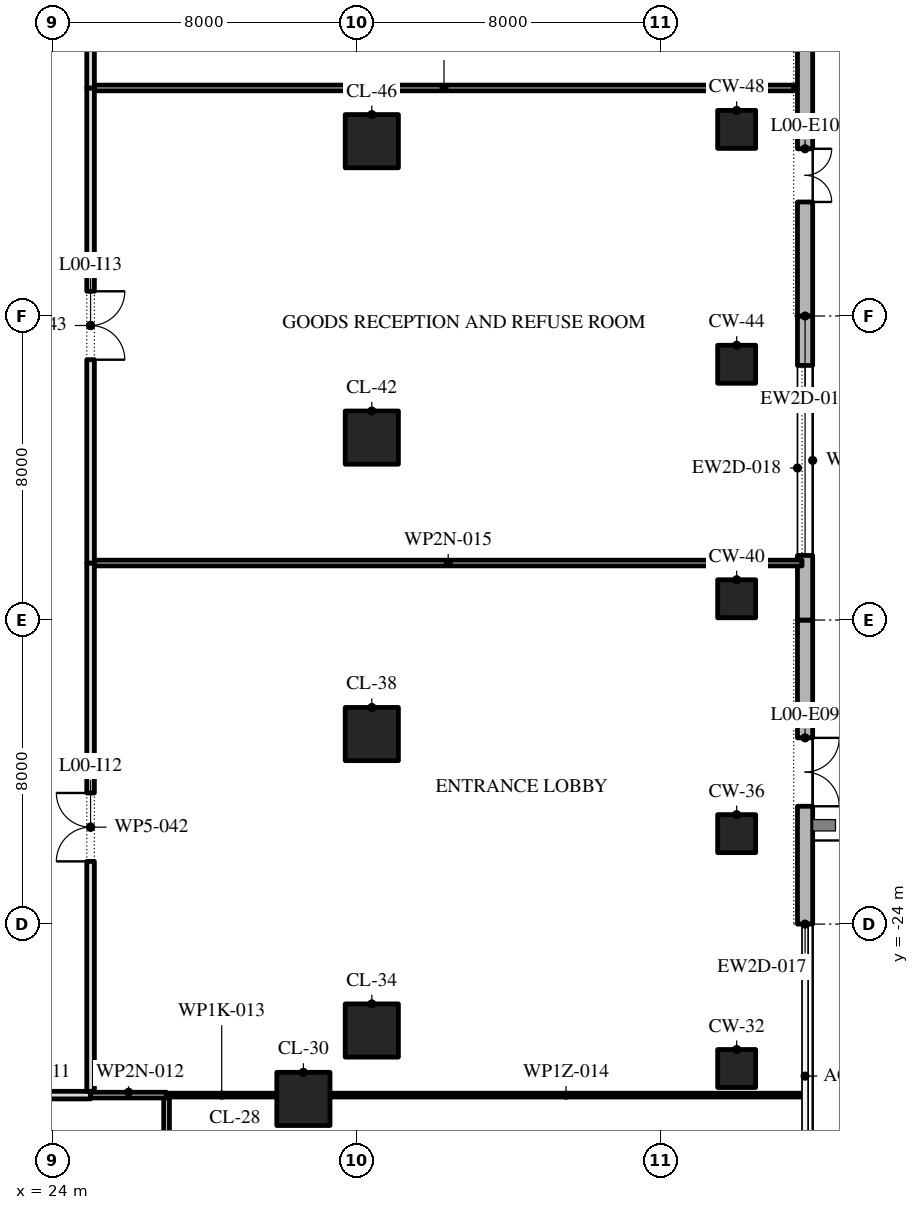
"""IFC4 building model, lengths in metres.
Left out: names, types, materials, properties, quantities, classifications, styles, units other than length and angle.
Written with IfcOpenShell. Run it as: python <this file> out.ifc"""

import sys

from ifc_helpers import new_model, si_unit, direction, frame, frame_2d, origin, origin_2d, place, context, subcontext, project, spatial, polyline, rectangle, outline, extrude, element, fill, save


model = new_model("IFC4")
c1 = context("Model", 3, precision=1e-05, world=origin(), true_north=direction((0.0, 1.0)))
c2 = subcontext(c1, "Body", "Model", "MODEL_VIEW")
j1 = project(units=[si_unit("LENGTHUNIT", "METRE"), si_unit("PLANEANGLEUNIT", "RADIAN")], contexts=[c1])
p1 = place(None, origin())
s1 = spatial("IfcSite", under=j1, at=p1, CompositionType="ELEMENT")
p2 = place(p1, origin())
s2 = spatial("IfcBuilding", under=s1, at=p2, CompositionType="ELEMENT")
p3 = place(p2, origin())
s3 = spatial("IfcBuildingStorey", under=s2, at=p3, CompositionType="ELEMENT", Elevation=0.0)
p4 = place(p3, frame((30.6, -28.6, 0.0), z_axis=(0.0, 0.0, 1.0), x_axis=(1.0, 0.0, 0.0)))
e1 = element("IfcColumn", 1, at=p4, inside=s3, PredefinedType="COLUMN", context=c2, shape_type="SweptSolid", body=[
    extrude(rectangle(XDim=1.4, YDim=1.4, at=origin_2d()), origin(), (0.0, 0.0, 1.0), 8.0),
])
p5 = place(p3, frame((42.0, -27.8, 0.0), z_axis=(0.0, 0.0, 1.0), x_axis=(1.0, 0.0, 0.0)))
e2 = element("IfcColumn", 2, at=p5, inside=s3, PredefinedType="COLUMN", context=c2, shape_type="SweptSolid", body=[
    extrude(rectangle(XDim=1.0, YDim=1.0, at=origin_2d()), origin(), (0.0, 0.0, 1.0), 8.0),
])
p6 = place(p3, frame((32.4, -26.8, 0.0), z_axis=(0.0, 0.0, 1.0), x_axis=(1.0, 0.0, 0.0)))
e3 = element("IfcColumn", 3, at=p6, inside=s3, PredefinedType="COLUMN", context=c2, shape_type="SweptSolid", body=[
    extrude(rectangle(XDim=1.4, YDim=1.4, at=origin_2d()), origin(), (0.0, 0.0, 1.0), 8.0),
])
p7 = place(p3, frame((42.0, -21.62, 0.0), z_axis=(0.0, 0.0, 1.0), x_axis=(1.0, 0.0, 0.0)))
e4 = element("IfcColumn", 4, at=p7, inside=s3, PredefinedType="COLUMN", context=c2, shape_type="SweptSolid", body=[
    extrude(rectangle(XDim=1.0, YDim=1.0, at=origin_2d()), origin(), (0.0, 0.0, 1.0), 8.0),
])
p8 = place(p3, frame((32.4, -19.0, 0.0), z_axis=(0.0, 0.0, 1.0), x_axis=(1.0, 0.0, 0.0)))
e5 = element("IfcColumn", 5, at=p8, inside=s3, PredefinedType="COLUMN", context=c2, shape_type="SweptSolid", body=[
    extrude(rectangle(XDim=1.4, YDim=1.4, at=origin_2d()), origin(), (0.0, 0.0, 1.0), 8.0),
])
p9 = place(p3, frame((42.0, -15.44, 0.0), z_axis=(0.0, 0.0, 1.0), x_axis=(1.0, 0.0, 0.0)))
e6 = element("IfcColumn", 6, at=p9, inside=s3, PredefinedType="COLUMN", context=c2, shape_type="SweptSolid", body=[
    extrude(rectangle(XDim=1.0, YDim=1.0, at=origin_2d()), origin(), (0.0, 0.0, 1.0), 8.0),
])
p10 = place(p3, frame((32.4, -11.2, 0.0), z_axis=(0.0, 0.0, 1.0), x_axis=(1.0, 0.0, 0.0)))
e7 = element("IfcColumn", 7, at=p10, inside=s3, PredefinedType="COLUMN", context=c2, shape_type="SweptSolid", body=[
    extrude(rectangle(XDim=1.4, YDim=1.4, at=origin_2d()), origin(), (0.0, 0.0, 1.0), 8.0),
])
p11 = place(p3, frame((42.0, -9.27, 0.0), z_axis=(0.0, 0.0, 1.0), x_axis=(1.0, 0.0, 0.0)))
e8 = element("IfcColumn", 8, at=p11, inside=s3, PredefinedType="COLUMN", context=c2, shape_type="SweptSolid", body=[
    extrude(rectangle(XDim=1.0, YDim=1.0, at=origin_2d()), origin(), (0.0, 0.0, 1.0), 8.0),
])
p12 = place(p3, frame((32.4, -3.4, 0.0), z_axis=(0.0, 0.0, 1.0), x_axis=(1.0, 0.0, 0.0)))
e9 = element("IfcColumn", 9, at=p12, inside=s3, PredefinedType="COLUMN", context=c2, shape_type="SweptSolid", body=[
    extrude(rectangle(XDim=1.4, YDim=1.4, at=origin_2d()), origin(), (0.0, 0.0, 1.0), 8.0),
])
p13 = place(p3, frame((42.0, -3.09, 0.0), z_axis=(0.0, 0.0, 1.0), x_axis=(1.0, 0.0, 0.0)))
e10 = element("IfcColumn", 10, at=p13, inside=s3, PredefinedType="COLUMN", context=c2, shape_type="SweptSolid", body=[
    extrude(rectangle(XDim=1.0, YDim=1.0, at=origin_2d()), origin(), (0.0, 0.0, 1.0), 8.0),
])
p14 = place(p3, frame((43.8, -24.0, 0.0), z_axis=(0.0, 0.0, 1.0), x_axis=(0.0, 1.0, 0.0)))
e11 = element("IfcWall", 11, at=p14, inside=s3, PredefinedType="STANDARD", context=c2, shape_type="SweptSolid", body=[
    extrude(rectangle(XDim=8.0, YDim=0.4, at=frame_2d((4.0, 0.0))), origin(), (0.0, 0.0, 1.0), 7.7),
])
p15 = place(p14, frame((3.1, 0.0, 0.0)))
e12 = element("IfcOpeningElement", 12, at=p15, cuts=e11, PredefinedType="OPENING", context=c2, shape_type="SweptSolid", body=[
    extrude(rectangle(XDim=1.8, YDim=2.7, at=frame_2d((0.9, 1.35))), frame((0.0, 0.21, 0.0), z_axis=(0.0, -1.0, 0.0), x_axis=(1.0, 0.0, 0.0)), (0.0, 0.0, 1.0), 0.42),
])
p16 = place(p3, frame((43.8, -16.0, 0.0), z_axis=(0.0, 0.0, 1.0), x_axis=(0.0, 1.0, 0.0)))
e13 = element("IfcWall", 13, at=p16, inside=s3, PredefinedType="STANDARD", context=c2, shape_type="SweptSolid", body=[
    extrude(rectangle(XDim=8.0, YDim=0.4, at=frame_2d((4.0, 0.0))), origin(), (0.0, 0.0, 1.0), 7.7),
])
p17 = place(p16, frame((1.7, 0.0, 0.5)))
e14 = element("IfcOpeningElement", 14, at=p17, cuts=e13, PredefinedType="OPENING", context=c2, shape_type="SweptSolid", body=[
    extrude(outline(polyline([(0.0, 0.0), (5.0, 0.0), (5.0, 3.35), (4.955, 3.907), (4.822, 4.451), (4.604, 4.966), (4.306, 5.44), (3.937, 5.86), (3.505, 6.216), (3.022, 6.498), (2.5, 6.7), (1.978, 6.498), (1.495, 6.216), (1.063, 5.86), (0.694, 5.44), (0.396, 4.966), (0.178, 4.451), (0.045, 3.907), (0.0, 3.35), (0.0, 0.0)])), frame((0.0, 0.21, 0.0), z_axis=(0.0, -1.0, 0.0), x_axis=(1.0, 0.0, 0.0)), (0.0, 0.0, 1.0), 0.42),
])
p18 = place(p3, frame((43.8, -8.0, 0.0), z_axis=(0.0, 0.0, 1.0), x_axis=(0.0, 1.0, 0.0)))
e15 = element("IfcWall", 15, at=p18, inside=s3, PredefinedType="STANDARD", context=c2, shape_type="SweptSolid", body=[
    extrude(rectangle(XDim=8.0, YDim=0.4, at=frame_2d((4.0, 0.0))), origin(), (0.0, 0.0, 1.0), 7.7),
])
p19 = place(p18, frame((3.0, 0.0, 0.0)))
e16 = element("IfcOpeningElement", 16, at=p19, cuts=e15, PredefinedType="OPENING", context=c2, shape_type="SweptSolid", body=[
    extrude(rectangle(XDim=1.4, YDim=2.7, at=frame_2d((0.7, 1.35))), frame((0.0, 0.21, 0.0), z_axis=(0.0, -1.0, 0.0), x_axis=(1.0, 0.0, 0.0)), (0.0, 0.0, 1.0), 0.42),
])
p20 = place(p3, frame((22.0, -28.5, 0.0), z_axis=(0.0, 0.0, 1.0), x_axis=(1.0, 0.0, 0.0)))
e17 = element("IfcWall", 17, at=p20, inside=s3, PredefinedType="PARTITIONING", context=c2, shape_type="SweptSolid", body=[
    extrude(rectangle(XDim=3.0, YDim=0.2, at=frame_2d((1.5, 0.0))), origin(), (0.0, 0.0, 1.0), 7.7),
])
p21 = place(p3, frame((25.0, -28.5, 0.0), z_axis=(0.0, 0.0, 1.0), x_axis=(1.0, 0.0, 0.0)))
e18 = element("IfcWall", 18, at=p21, inside=s3, PredefinedType="PARTITIONING", context=c2, shape_type="SweptSolid", body=[
    extrude(rectangle(XDim=2.0, YDim=0.15, at=frame_2d((1.0, 0.0))), origin(), (0.0, 0.0, 1.0), 7.7),
])
p22 = place(p3, frame((27.0, -28.5, 0.0), z_axis=(0.0, 0.0, 1.0), x_axis=(1.0, 0.0, 0.0)))
e19 = element("IfcWall", 19, at=p22, inside=s3, PredefinedType="PARTITIONING", context=c2, shape_type="SweptSolid", body=[
    extrude(rectangle(XDim=2.9, YDim=0.1, at=frame_2d((1.45, 0.0))), origin(), (0.0, 0.0, 1.0), 7.7),
])
p23 = place(p3, frame((31.3, -28.5, 0.0), z_axis=(0.0, 0.0, 1.0), x_axis=(1.0, 0.0, 0.0)))
e20 = element("IfcWall", 20, at=p23, inside=s3, PredefinedType="PARTITIONING", context=c2, shape_type="SweptSolid", body=[
    extrude(rectangle(XDim=12.42, YDim=0.1, at=frame_2d((6.21, 0.0))), origin(), (0.0, 0.0, 1.0), 7.164),
])
p24 = place(p3, frame((25.1, -14.5, 0.0), z_axis=(0.0, 0.0, 1.0), x_axis=(1.0, 0.0, 0.0)))
e21 = element("IfcWall", 21, at=p24, inside=s3, PredefinedType="PARTITIONING", context=c2, shape_type="SweptSolid", body=[
    extrude(rectangle(XDim=18.62, YDim=0.15, at=frame_2d((9.31, 0.0))), origin(), (0.0, 0.0, 1.0), 7.7),
])
p25 = place(p3, frame((25.1, -2.0, 0.0), z_axis=(0.0, 0.0, 1.0), x_axis=(1.0, 0.0, 0.0)))
e22 = element("IfcWall", 22, at=p25, inside=s3, PredefinedType="PARTITIONING", context=c2, shape_type="SweptSolid", body=[
    extrude(rectangle(XDim=18.4, YDim=0.15, at=frame_2d((9.2, 0.0))), origin(), (0.0, 0.0, 1.0), 7.7),
])
p26 = place(p3, frame((25.0, -28.4, 0.0), z_axis=(0.0, 0.0, 1.0), x_axis=(0.0, 1.0, 0.0)))
e23 = element("IfcWall", 23, at=p26, inside=s3, PredefinedType="PARTITIONING", context=c2, shape_type="SweptSolid", body=[
    extrude(rectangle(XDim=13.9, YDim=0.2, at=frame_2d((6.95, 0.0))), origin(), (0.0, 0.0, 1.0), 7.7),
])
p27 = place(p26, frame((6.05, 0.0, 0.0)))
e24 = element("IfcOpeningElement", 24, at=p27, cuts=e23, PredefinedType="OPENING", context=c2, shape_type="SweptSolid", body=[
    extrude(rectangle(XDim=1.8, YDim=2.1, at=frame_2d((0.9, 1.05))), frame((0.0, 0.11, 0.0), z_axis=(0.0, -1.0, 0.0), x_axis=(1.0, 0.0, 0.0)), (0.0, 0.0, 1.0), 0.22),
])
p28 = place(p3, frame((25.0, -14.5, 0.0), z_axis=(0.0, 0.0, 1.0), x_axis=(0.0, 1.0, 0.0)))
e25 = element("IfcWall", 25, at=p28, inside=s3, PredefinedType="PARTITIONING", context=c2, shape_type="SweptSolid", body=[
    extrude(rectangle(XDim=12.5, YDim=0.2, at=frame_2d((6.25, 0.0))), origin(), (0.0, 0.0, 1.0), 7.7),
])
p29 = place(p28, frame((5.35, 0.0, 0.0)))
e26 = element("IfcOpeningElement", 26, at=p29, cuts=e25, PredefinedType="OPENING", context=c2, shape_type="SweptSolid", body=[
    extrude(rectangle(XDim=1.8, YDim=2.1, at=frame_2d((0.9, 1.05))), frame((0.0, 0.11, 0.0), z_axis=(0.0, -1.0, 0.0), x_axis=(1.0, 0.0, 0.0)), (0.0, 0.0, 1.0), 0.22),
])
p30 = place(p3, frame((25.0, -2.0, 0.0), z_axis=(0.0, 0.0, 1.0), x_axis=(0.0, 1.0, 0.0)))
e27 = element("IfcWall", 27, at=p30, inside=s3, PredefinedType="PARTITIONING", context=c2, shape_type="SweptSolid", body=[
    extrude(rectangle(XDim=10.0, YDim=0.2, at=frame_2d((5.0, 0.0))), origin(), (0.0, 0.0, 1.0), 7.7),
])
p31 = place(p30, frame((4.1, 0.0, 0.0)))
e28 = element("IfcOpeningElement", 28, at=p31, cuts=e27, PredefinedType="OPENING", context=c2, shape_type="SweptSolid", body=[
    extrude(rectangle(XDim=1.8, YDim=2.1, at=frame_2d((0.9, 1.05))), frame((0.0, 0.11, 0.0), z_axis=(0.0, -1.0, 0.0), x_axis=(1.0, 0.0, 0.0)), (0.0, 0.0, 1.0), 0.22),
])
p32 = place(p3, frame((27.0, -42.0, 0.0), z_axis=(0.0, 0.0, 1.0), x_axis=(0.0, 1.0, 0.0)))
e29 = element("IfcWall", 29, at=p32, inside=s3, PredefinedType="PARTITIONING", context=c2, shape_type="SweptSolid", body=[
    extrude(rectangle(XDim=13.425, YDim=0.15, at=frame_2d((6.712, 0.0))), origin(), (0.0, 0.0, 1.0), 7.7),
])
p33 = place(p32, frame((5.812, 0.0, 0.0)))
e30 = element("IfcOpeningElement", 30, at=p33, cuts=e29, PredefinedType="OPENING", context=c2, shape_type="SweptSolid", body=[
    extrude(rectangle(XDim=1.8, YDim=2.1, at=frame_2d((0.9, 1.05))), frame((0.0, 0.085, 0.0), z_axis=(0.0, -1.0, 0.0), x_axis=(1.0, 0.0, 0.0)), (0.0, 0.0, 1.0), 0.17),
])
p34 = place(p15, frame((1.8, 0.0, 0.0), z_axis=(0.0, 0.0, 1.0), x_axis=(-1.0, 0.0, 0.0)))
e31 = element("IfcDoor", 31, at=p34, inside=s3, OperationType="DOUBLE_DOOR_SINGLE_SWING", PredefinedType="DOOR", context=c2, shape_type="SweptSolid", body=[
    extrude(rectangle(XDim=1.8, YDim=2.7, at=frame_2d((0.9, 1.35))), frame((0.0, 0.025, 0.0), z_axis=(0.0, -1.0, 0.0), x_axis=(1.0, 0.0, 0.0)), (0.0, 0.0, 1.0), 0.05),
])
fill(e12, e31)
p35 = place(p17, origin())
e32 = element("IfcWindow", 32, at=p35, inside=s3, PartitioningType="DOUBLE_PANEL_VERTICAL", PredefinedType="WINDOW", context=c2, shape_type="SweptSolid", body=[
    extrude(outline(polyline([(0.0, 0.0), (5.0, 0.0), (5.0, 3.35), (4.955, 3.907), (4.822, 4.451), (4.604, 4.966), (4.306, 5.44), (3.937, 5.86), (3.505, 6.216), (3.022, 6.498), (2.5, 6.7), (1.978, 6.498), (1.495, 6.216), (1.063, 5.86), (0.694, 5.44), (0.396, 4.966), (0.178, 4.451), (0.045, 3.907), (0.0, 3.35), (0.0, 0.0)])), frame((0.0, 0.03, 0.0), z_axis=(0.0, -1.0, 0.0), x_axis=(1.0, 0.0, 0.0)), (0.0, 0.0, 1.0), 0.06),
])
fill(e14, e32)
p36 = place(p19, frame((1.4, 0.0, 0.0), z_axis=(0.0, 0.0, 1.0), x_axis=(-1.0, 0.0, 0.0)))
e33 = element("IfcDoor", 33, at=p36, inside=s3, OperationType="DOUBLE_DOOR_SINGLE_SWING", PredefinedType="DOOR", context=c2, shape_type="SweptSolid", body=[
    extrude(rectangle(XDim=1.4, YDim=2.7, at=frame_2d((0.7, 1.35))), frame((0.0, 0.025, 0.0), z_axis=(0.0, -1.0, 0.0), x_axis=(1.0, 0.0, 0.0)), (0.0, 0.0, 1.0), 0.05),
])
fill(e16, e33)
p37 = place(p27, origin())
e34 = element("IfcDoor", 34, at=p37, inside=s3, OperationType="SINGLE_SWING_RIGHT", PredefinedType="DOOR", context=c2, shape_type="SweptSolid", body=[
    extrude(rectangle(XDim=1.8, YDim=2.1, at=frame_2d((0.9, 1.05))), frame((0.0, 0.025, 0.0), z_axis=(0.0, -1.0, 0.0), x_axis=(1.0, 0.0, 0.0)), (0.0, 0.0, 1.0), 0.05),
])
fill(e24, e34)
p38 = place(p29, frame((1.8, 0.0, 0.0), z_axis=(0.0, 0.0, 1.0), x_axis=(-1.0, 0.0, 0.0)))
e35 = element("IfcDoor", 35, at=p38, inside=s3, OperationType="SINGLE_SWING_LEFT", PredefinedType="DOOR", context=c2, shape_type="SweptSolid", body=[
    extrude(rectangle(XDim=1.8, YDim=2.1, at=frame_2d((0.9, 1.05))), frame((0.0, 0.025, 0.0), z_axis=(0.0, -1.0, 0.0), x_axis=(1.0, 0.0, 0.0)), (0.0, 0.0, 1.0), 0.05),
])
fill(e26, e35)
save(model, sys.argv[1])
